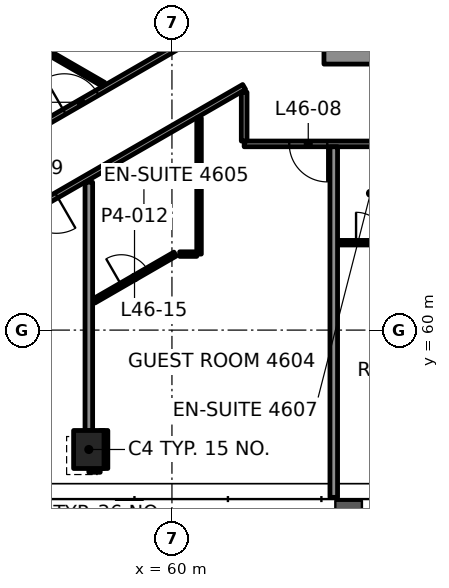
"""IFC4 building model, lengths in metres.
Left out: names, types, materials, properties, quantities, classifications, styles, units other than length and angle.
Written with IfcOpenShell. Run it as: python <this file> out.ifc"""

import sys

from ifc_helpers import new_model, si_unit, direction, frame, frame_2d, origin, origin_2d, place, context, subcontext, project, spatial, rectangle, hollow_rectangle, extrude, element, fill, save


model = new_model("IFC4")
c1 = context("Model", 3, precision=1e-05, world=origin(), true_north=direction((0.0, 1.0)))
c2 = subcontext(c1, "Body", "Model", "MODEL_VIEW")
j1 = project(units=[si_unit("LENGTHUNIT", "METRE"), si_unit("PLANEANGLEUNIT", "RADIAN")], contexts=[c1])
p1 = place(None, origin())
s1 = spatial("IfcSite", under=j1, at=p1, CompositionType="ELEMENT")
p2 = place(p1, origin())
s2 = spatial("IfcBuilding", under=s1, at=p2, CompositionType="ELEMENT")
p3 = place(p2, frame((0.0, 0.0, 198.7)))
s3 = spatial("IfcBuildingStorey", under=s2, at=p3, CompositionType="ELEMENT", Elevation=198.7)
p4 = place(p3, frame((57.812, 56.858, -0.0), z_axis=(0.0, 0.0, 1.0), x_axis=(1.0, 0.0, 0.0)))
e1 = element("IfcColumn", 1, at=p4, inside=s3, PredefinedType="COLUMN", context=c2, shape_type="SweptSolid", body=[
    extrude(hollow_rectangle(XDim=0.8, YDim=1.0, WallThickness=0.05, at=origin_2d()), origin(), (0.0, 0.0, 1.0), 3.9),
])
p5 = place(p3, frame((64.0, 67.375, 0.0), z_axis=(0.0, 0.0, 1.0), x_axis=(1.0, 0.0, 0.0)))
e2 = element("IfcWall", 2, at=p5, inside=s3, PredefinedType="SHEAR", context=c2, shape_type="SweptSolid", body=[
    extrude(rectangle(XDim=22.0, YDim=0.75, at=frame_2d((11.0, 0.0))), origin(), (0.0, 0.0, 1.0), 3.7),
])
p6 = place(p5, frame((3.15, 0.0, 0.0)))
e3 = element("IfcOpeningElement", 3, at=p6, cuts=e2, PredefinedType="OPENING", context=c2, shape_type="SweptSolid", body=[
    extrude(rectangle(XDim=0.9, YDim=2.1, at=frame_2d((0.45, 1.05))), frame((0.0, 0.385, 0.0), z_axis=(0.0, -1.0, 0.0), x_axis=(1.0, 0.0, 0.0)), (0.0, 0.0, 1.0), 0.77),
])
p7 = place(p3, frame((57.812, 56.358, 0.0), z_axis=(0.0, 0.0, 1.0), x_axis=(1.0, 0.0, 0.0)))
e4 = element("IfcWall", 4, at=p7, inside=s3, PredefinedType="PARTITIONING", context=c2, shape_type="SweptSolid", body=[
    extrude(rectangle(XDim=0.3, YDim=0.2, at=frame_2d((0.15, 0.0))), origin(), (0.0, 0.0, 1.0), 3.1),
])
p8 = place(p3, frame((60.203, 62.0, 0.0), z_axis=(0.0, 0.0, 1.0), x_axis=(1.0, 0.0, 0.0)))
e5 = element("IfcWall", 5, at=p8, inside=s3, PredefinedType="PARTITIONING", context=c2, shape_type="SweptSolid", body=[
    extrude(rectangle(XDim=0.449, YDim=0.12, at=frame_2d((0.225, 0.0))), origin(), (0.0, 0.0, 1.0), 3.1),
])
p9 = place(p3, frame((64.368, 62.3, 0.0), z_axis=(0.0, 0.0, 1.0), x_axis=(1.0, 0.0, 0.0)))
e6 = element("IfcWall", 6, at=p9, inside=s3, PredefinedType="PARTITIONING", context=c2, shape_type="SweptSolid", body=[
    extrude(rectangle(XDim=1.753, YDim=0.12, at=frame_2d((0.877, 0.0))), origin(), (0.0, 0.0, 1.0), 3.1),
])
p10 = place(p9, frame((0.477, 0.0, 0.0)))
e7 = element("IfcOpeningElement", 7, at=p10, cuts=e6, PredefinedType="OPENING", context=c2, shape_type="SweptSolid", body=[
    extrude(rectangle(XDim=0.8, YDim=2.1, at=frame_2d((0.4, 1.05))), frame((0.0, 0.07, 0.0), z_axis=(0.0, -1.0, 0.0), x_axis=(1.0, 0.0, 0.0)), (0.0, 0.0, 1.0), 0.14),
])
p11 = place(p3, frame((88.1, 64.9, 0.0), z_axis=(0.0, 0.0, 1.0), x_axis=(-1.0, 0.0, 0.0)))
e8 = element("IfcWall", 8, at=p11, inside=s3, PredefinedType="PARTITIONING", context=c2, shape_type="SweptSolid", body=[
    extrude(rectangle(XDim=26.2, YDim=0.15, at=frame_2d((13.1, 0.0))), origin(), (0.0, 0.0, 1.0), 3.1),
])
p12 = place(p11, frame((7.443, 0.0, 0.0)))
e9 = element("IfcOpeningElement", 9, at=p12, cuts=e8, PredefinedType="OPENING", context=c2, shape_type="SweptSolid", body=[
    extrude(rectangle(XDim=1.0, YDim=2.1, at=frame_2d((0.5, 1.05))), frame((0.0, 0.085, 0.0), z_axis=(0.0, -1.0, 0.0), x_axis=(1.0, 0.0, 0.0)), (0.0, 0.0, 1.0), 0.17),
])
p13 = place(p11, frame((16.037, 0.0, 0.0)))
e10 = element("IfcOpeningElement", 10, at=p13, cuts=e8, PredefinedType="OPENING", context=c2, shape_type="SweptSolid", body=[
    extrude(rectangle(XDim=1.0, YDim=2.1, at=frame_2d((0.5, 1.05))), frame((0.0, 0.085, 0.0), z_axis=(0.0, -1.0, 0.0), x_axis=(1.0, 0.0, 0.0)), (0.0, 0.0, 1.0), 0.17),
])
p14 = place(p11, frame((19.747, 0.0, 0.0)))
e11 = element("IfcOpeningElement", 11, at=p14, cuts=e8, PredefinedType="OPENING", context=c2, shape_type="SweptSolid", body=[
    extrude(rectangle(XDim=1.0, YDim=2.1, at=frame_2d((0.5, 1.05))), frame((0.0, 0.085, 0.0), z_axis=(0.0, -1.0, 0.0), x_axis=(1.0, 0.0, 0.0)), (0.0, 0.0, 1.0), 0.17),
])
p15 = place(p11, frame((24.013, 0.0, 0.0)))
e12 = element("IfcOpeningElement", 12, at=p15, cuts=e8, PredefinedType="OPENING", context=c2, shape_type="SweptSolid", body=[
    extrude(rectangle(XDim=1.0, YDim=2.1, at=frame_2d((0.5, 1.05))), frame((0.0, 0.085, 0.0), z_axis=(0.0, -1.0, 0.0), x_axis=(1.0, 0.0, 0.0)), (0.0, 0.0, 1.0), 0.17),
])
p16 = place(p3, frame((57.947, 60.767, 0.0), z_axis=(0.0, 0.0, 1.0), x_axis=(0.866060325455, 0.499939509014, 0.0)))
e13 = element("IfcWall", 13, at=p16, inside=s3, PredefinedType="PARTITIONING", context=c2, shape_type="SweptSolid", body=[
    extrude(rectangle(XDim=2.467, YDim=0.12, at=frame_2d((1.233, 0.0))), origin(), (0.0, 0.0, 1.0), 3.1),
])
p17 = place(p16, frame((0.833, 0.0, 0.0)))
e14 = element("IfcOpeningElement", 14, at=p17, cuts=e13, PredefinedType="OPENING", context=c2, shape_type="SweptSolid", body=[
    extrude(rectangle(XDim=0.8, YDim=2.1, at=frame_2d((0.4, 1.05))), frame((0.0, 0.07, 0.0), z_axis=(0.0, -1.0, 0.0), x_axis=(1.0, 0.0, 0.0)), (0.0, 0.0, 1.0), 0.14),
])
p18 = place(p3, frame((61.9, 66.397, 0.0), z_axis=(0.0, 0.0, 1.0), x_axis=(-0.866028610752, -0.499994445327, 0.0)))
e15 = element("IfcWall", 15, at=p18, inside=s3, PredefinedType="PARTITIONING", context=c2, shape_type="SweptSolid", body=[
    extrude(rectangle(XDim=13.002, YDim=0.15, at=frame_2d((6.501, 0.0))), origin(), (0.0, 0.0, 1.0), 2.947),
])
p19 = place(p18, frame((5.701, 0.0, 0.0)))
e16 = element("IfcOpeningElement", 16, at=p19, cuts=e15, PredefinedType="OPENING", context=c2, shape_type="SweptSolid", body=[
    extrude(rectangle(XDim=1.0, YDim=2.1, at=frame_2d((0.5, 1.05))), frame((0.0, 0.085, 0.0), z_axis=(0.0, -1.0, 0.0), x_axis=(1.0, 0.0, 0.0)), (0.0, 0.0, 1.0), 0.17),
])
p20 = place(p3, frame((49.74, 61.456, 0.0), z_axis=(0.0, 0.0, 1.0), x_axis=(0.866030582951, 0.499991029314, 0.0)))
e17 = element("IfcWall", 17, at=p20, inside=s3, PredefinedType="PARTITIONING", context=c2, shape_type="SweptSolid", body=[
    extrude(rectangle(XDim=13.954, YDim=0.15, at=frame_2d((6.977, 0.0))), origin(), (0.0, 0.0, 1.0), 3.1),
])
p21 = place(p20, frame((2.552, 0.0, 0.0)))
e18 = element("IfcOpeningElement", 18, at=p21, cuts=e17, PredefinedType="OPENING", context=c2, shape_type="SweptSolid", body=[
    extrude(rectangle(XDim=0.9, YDim=2.1, at=frame_2d((0.45, 1.05))), frame((0.0, 0.085, 0.0), z_axis=(0.0, -1.0, 0.0), x_axis=(1.0, 0.0, 0.0)), (0.0, 0.0, 1.0), 0.17),
])
p22 = place(p20, frame((8.579, 0.0, 0.0)))
e19 = element("IfcOpeningElement", 19, at=p22, cuts=e17, PredefinedType="OPENING", context=c2, shape_type="SweptSolid", body=[
    extrude(rectangle(XDim=1.0, YDim=2.1, at=frame_2d((0.5, 1.05))), frame((0.0, 0.085, 0.0), z_axis=(0.0, -1.0, 0.0), x_axis=(1.0, 0.0, 0.0)), (0.0, 0.0, 1.0), 0.17),
])
p23 = place(p3, frame((64.258, 55.598, 0.0), z_axis=(0.0, 0.0, 1.0), x_axis=(0.0, 1.0, 0.0)))
e20 = element("IfcWall", 20, at=p23, inside=s3, PredefinedType="PARTITIONING", context=c2, shape_type="SweptSolid", body=[
    extrude(rectangle(XDim=9.227, YDim=0.2, at=frame_2d((4.613, 0.0))), origin(), (0.0, 0.0, 1.0), 3.022),
])
p24 = place(p3, frame((61.9, 64.975, 0.0), z_axis=(0.0, 0.0, 1.0), x_axis=(0.0, 1.0, 0.0)))
e21 = element("IfcWall", 21, at=p24, inside=s3, PredefinedType="PARTITIONING", context=c2, shape_type="SweptSolid", body=[
    extrude(rectangle(XDim=1.286, YDim=0.15, at=frame_2d((0.643, 0.0))), origin(), (0.0, 0.0, 1.0), 2.947),
])
p25 = place(p3, frame((60.713, 62.0, 0.0), z_axis=(0.0, 0.0, 1.0), x_axis=(0.0, 1.0, 0.0)))
e22 = element("IfcWall", 22, at=p25, inside=s3, PredefinedType="PARTITIONING", context=c2, shape_type="SweptSolid", body=[
    extrude(rectangle(XDim=3.585, YDim=0.12, at=frame_2d((1.793, 0.0))), origin(), (0.0, 0.0, 1.0), 2.947),
])
p26 = place(p3, frame((58.213, 56.358, 0.0), z_axis=(0.0, 0.0, 1.0), x_axis=(0.0, 1.0, 0.0)))
e23 = element("IfcWall", 23, at=p26, inside=s3, PredefinedType="PARTITIONING", context=c2, shape_type="SweptSolid", body=[
    extrude(rectangle(XDim=1.0, YDim=0.2, at=frame_2d((0.5, 0.0))), origin(), (0.0, 0.0, 1.0), 3.022),
])
p27 = place(p3, frame((57.813, 57.358, 0.0), z_axis=(0.0, 0.0, 1.0), x_axis=(0.0, 1.0, 0.0)))
e24 = element("IfcWall", 24, at=p27, inside=s3, PredefinedType="PARTITIONING", context=c2, shape_type="SweptSolid", body=[
    extrude(rectangle(XDim=6.532, YDim=0.2, at=frame_2d((3.266, 0.0))), origin(), (0.0, 0.0, 1.0), 3.1),
])
p28 = place(p3, frame((58.199, 66.466, 0.0), z_axis=(0.0, 0.0, 1.0), x_axis=(-0.866028856698, 0.499994019331, 0.0)))
e25 = element("IfcWall", 25, at=p28, inside=s3, PredefinedType="PARTITIONING", context=c2, shape_type="SweptSolid", body=[
    extrude(rectangle(XDim=3.113, YDim=0.12, at=frame_2d((1.556, 0.0))), origin(), (0.0, 0.0, 1.0), 3.1),
])
p29 = place(p10, origin())
e26 = element("IfcDoor", 26, at=p29, inside=s3, OperationType="SINGLE_SWING_RIGHT", PredefinedType="DOOR", context=c2, shape_type="SweptSolid", body=[
    extrude(rectangle(XDim=0.8, YDim=2.1, at=frame_2d((0.4, 1.05))), frame((0.0, 0.025, 0.0), z_axis=(0.0, -1.0, 0.0), x_axis=(1.0, 0.0, 0.0)), (0.0, 0.0, 1.0), 0.05),
])
fill(e7, e26)
p30 = place(p15, origin())
e27 = element("IfcDoor", 27, at=p30, inside=s3, OperationType="SINGLE_SWING_RIGHT", PredefinedType="DOOR", context=c2, shape_type="SweptSolid", body=[
    extrude(rectangle(XDim=1.0, YDim=2.1, at=frame_2d((0.5, 1.05))), frame((0.0, 0.025, 0.0), z_axis=(0.0, -1.0, 0.0), x_axis=(1.0, 0.0, 0.0)), (0.0, 0.0, 1.0), 0.05),
])
fill(e12, e27)
p31 = place(p17, origin())
e28 = element("IfcDoor", 28, at=p31, inside=s3, OperationType="SINGLE_SWING_RIGHT", PredefinedType="DOOR", context=c2, shape_type="SweptSolid", body=[
    extrude(rectangle(XDim=0.8, YDim=2.1, at=frame_2d((0.4, 1.05))), frame((0.0, 0.025, 0.0), z_axis=(0.0, -1.0, 0.0), x_axis=(1.0, 0.0, 0.0)), (0.0, 0.0, 1.0), 0.05),
])
fill(e14, e28)
p32 = place(p19, origin())
e29 = element("IfcDoor", 29, at=p32, inside=s3, OperationType="SINGLE_SWING_RIGHT", PredefinedType="DOOR", context=c2, shape_type="SweptSolid", body=[
    extrude(rectangle(XDim=1.0, YDim=2.1, at=frame_2d((0.5, 1.05))), frame((0.0, 0.025, 0.0), z_axis=(0.0, -1.0, 0.0), x_axis=(1.0, 0.0, 0.0)), (0.0, 0.0, 1.0), 0.05),
])
fill(e16, e29)
p33 = place(p22, origin())
e30 = element("IfcDoor", 30, at=p33, inside=s3, OperationType="SINGLE_SWING_RIGHT", PredefinedType="DOOR", context=c2, shape_type="SweptSolid", body=[
    extrude(rectangle(XDim=1.0, YDim=2.1, at=frame_2d((0.5, 1.05))), frame((0.0, 0.025, 0.0), z_axis=(0.0, -1.0, 0.0), x_axis=(1.0, 0.0, 0.0)), (0.0, 0.0, 1.0), 0.05),
])
fill(e19, e30)
save(model, sys.argv[1])
